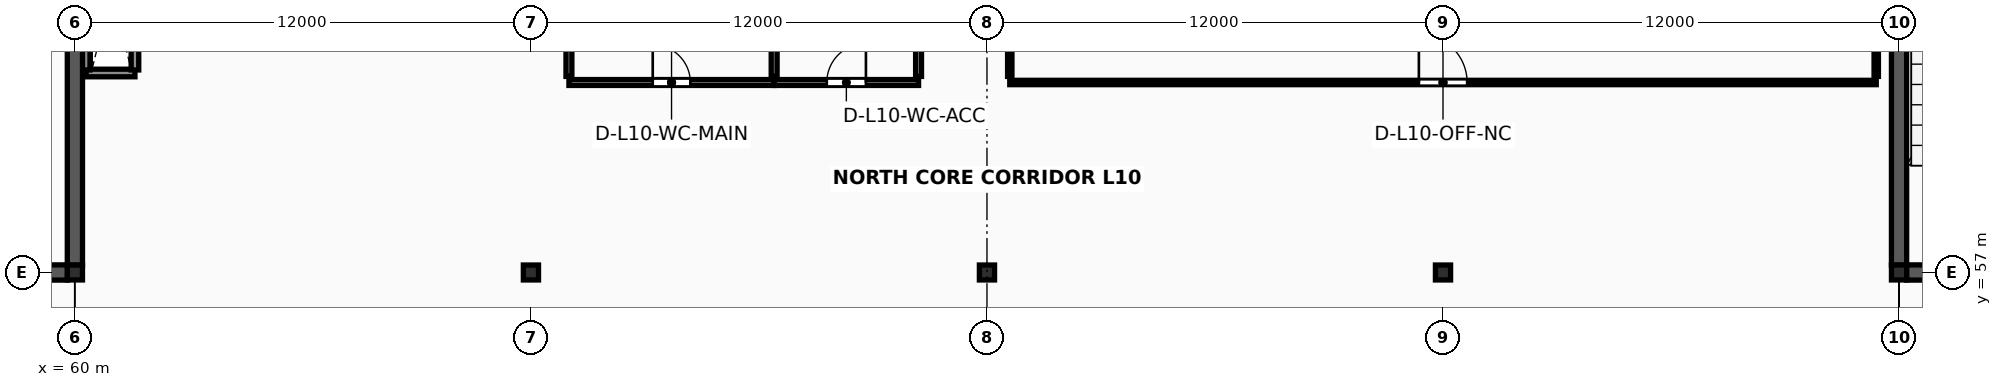
"""IFC4 building model, lengths in metres.
Left out: names, types, materials, properties, quantities, classifications, styles, units other than length and angle.
Written with IfcOpenShell. Run it as: python <this file> out.ifc"""

import sys

from ifc_helpers import new_model, si_unit, direction, frame, frame_2d, origin, origin_2d, place, context, subcontext, project, spatial, rectangle, i_section, extrude, element, fill, save


model = new_model("IFC4")
c1 = context("Model", 3, precision=1e-05, world=origin(), true_north=direction((0.0, 1.0)))
c2 = subcontext(c1, "Body", "Model", "MODEL_VIEW")
j1 = project(units=[si_unit("LENGTHUNIT", "METRE"), si_unit("PLANEANGLEUNIT", "RADIAN")], contexts=[c1])
p1 = place(None, origin())
s1 = spatial("IfcSite", under=j1, at=p1, CompositionType="ELEMENT")
p2 = place(p1, origin())
s2 = spatial("IfcBuilding", under=s1, at=p2, CompositionType="ELEMENT")
p3 = place(p2, frame((0.0, 0.0, 41.6)))
s3 = spatial("IfcBuildingStorey", under=s2, at=p3, CompositionType="ELEMENT", Elevation=41.6)
for number, where, z_axis, x_axis in (
    (1, (60.0, 57.0, 0.0), (0.0, 0.0, 1.0), (1.0, 0.0, 0.0)),
    (2, (72.0, 57.0, 0.0), (0.0, 0.0, 1.0), (1.0, 0.0, 0.0)),
    (3, (84.0, 57.0, 0.0), (0.0, 0.0, 1.0), (1.0, 0.0, 0.0)),
    (4, (96.0, 57.0, 0.0), (0.0, 0.0, 1.0), (1.0, 0.0, 0.0)),
    (5, (108.0, 57.0, 0.0), (0.0, 0.0, 1.0), (1.0, 0.0, 0.0)),
):
    element("IfcColumn", number, at=place(p3, frame(where, z_axis=z_axis, x_axis=x_axis)), inside=s3, PredefinedType="COLUMN", context=c2, shape_type="SweptSolid", body=[
        extrude(i_section(OverallWidth=0.399, OverallDepth=0.393, WebThickness=0.023, FlangeThickness=0.037, FilletRadius=0.018, at=origin_2d()), origin(), (0.0, 0.0, 1.0), 4.0),
    ])
p4 = place(p3, frame((60.297, 62.25, 0.0), z_axis=(0.0, 0.0, 1.0), x_axis=(1.0, 0.0, 0.0)))
e6 = element("IfcWall", 6, at=p4, inside=s3, PredefinedType="SOLIDWALL", context=c2, shape_type="SweptSolid", body=[
    extrude(rectangle(XDim=1.283, YDim=0.2, at=frame_2d((0.642, 0.0))), origin(), (0.0, 0.0, 1.0), 3.828),
])
for number, where, z_axis, x_axis in (
    (7, (60.297, 62.33, 0.0), (0.0, 0.0, 1.0), (0.0, 1.0, 0.0)),
    (8, (61.58, 62.33, 0.0), (0.0, 0.0, 1.0), (0.0, 1.0, 0.0)),
):
    element("IfcWall", number, at=place(p3, frame(where, z_axis=z_axis, x_axis=x_axis)), inside=s3, PredefinedType="SOLIDWALL", context=c2, shape_type="SweptSolid", body=[
        extrude(rectangle(XDim=4.14, YDim=0.2, at=frame_2d((2.07, 0.0))), origin(), (0.0, 0.0, 1.0), 3.828),
    ])
p5 = place(p3, frame((48.197, 57.0, 0.0), z_axis=(0.0, 0.0, 1.0), x_axis=(1.0, 0.0, 0.0)))
e9 = element("IfcWall", 9, at=p5, inside=s3, PredefinedType="SHEAR", context=c2, shape_type="SweptSolid", body=[
    extrude(rectangle(XDim=11.607, YDim=0.4, at=frame_2d((5.803, 0.0))), origin(), (0.0, 0.0, 1.0), 3.828),
])
p6 = place(p5, frame((5.004, 0.0, 0.0)))
e10 = element("IfcOpeningElement", 10, at=p6, cuts=e9, PredefinedType="OPENING", context=c2, shape_type="SweptSolid", body=[
    extrude(rectangle(XDim=1.2, YDim=2.2, at=frame_2d((0.6, 1.1))), frame((0.0, 0.215, 0.0), z_axis=(0.0, -1.0, 0.0), x_axis=(1.0, 0.0, 0.0)), (0.0, 0.0, 1.0), 0.43),
])
p7 = place(p5, frame((8.703, 0.0, 0.0)))
e11 = element("IfcOpeningElement", 11, at=p7, cuts=e9, PredefinedType="OPENING", context=c2, shape_type="SweptSolid", body=[
    extrude(rectangle(XDim=1.5, YDim=2.25, at=frame_2d((0.75, 1.125))), frame((0.0, 0.215, 0.0), z_axis=(0.0, -1.0, 0.0), x_axis=(1.0, 0.0, 0.0)), (0.0, 0.0, 1.0), 0.43),
])
p8 = place(p3, frame((60.0, 57.194, 0.0), z_axis=(0.0, 0.0, 1.0), x_axis=(0.0, 1.0, 0.0)))
e12 = element("IfcWall", 12, at=p8, inside=s3, PredefinedType="SHEAR", context=c2, shape_type="SweptSolid", body=[
    extrude(rectangle(XDim=11.613, YDim=0.4, at=frame_2d((5.806, 0.0))), origin(), (0.0, 0.0, 1.0), 3.828),
])
p9 = place(p3, frame((108.197, 57.0, 0.0), z_axis=(0.0, 0.0, 1.0), x_axis=(1.0, 0.0, 0.0)))
e13 = element("IfcWall", 13, at=p9, inside=s3, PredefinedType="SHEAR", context=c2, shape_type="SweptSolid", body=[
    extrude(rectangle(XDim=11.607, YDim=0.4, at=frame_2d((5.803, 0.0))), origin(), (0.0, 0.0, 1.0), 3.828),
])
p10 = place(p9, frame((5.004, 0.0, 0.0)))
e14 = element("IfcOpeningElement", 14, at=p10, cuts=e13, PredefinedType="OPENING", context=c2, shape_type="SweptSolid", body=[
    extrude(rectangle(XDim=1.2, YDim=2.2, at=frame_2d((0.6, 1.1))), frame((0.0, 0.215, 0.0), z_axis=(0.0, -1.0, 0.0), x_axis=(1.0, 0.0, 0.0)), (0.0, 0.0, 1.0), 0.43),
])
p11 = place(p9, frame((8.704, 0.0, 0.0)))
e15 = element("IfcOpeningElement", 15, at=p11, cuts=e13, PredefinedType="OPENING", context=c2, shape_type="SweptSolid", body=[
    extrude(rectangle(XDim=1.5, YDim=2.25, at=frame_2d((0.75, 1.125))), frame((0.0, 0.215, 0.0), z_axis=(0.0, -1.0, 0.0), x_axis=(1.0, 0.0, 0.0)), (0.0, 0.0, 1.0), 0.43),
])
p12 = place(p3, frame((108.0, 57.194, 0.0), z_axis=(0.0, 0.0, 1.0), x_axis=(0.0, 1.0, 0.0)))
e16 = element("IfcWall", 16, at=p12, inside=s3, PredefinedType="SHEAR", context=c2, shape_type="SweptSolid", body=[
    extrude(rectangle(XDim=11.613, YDim=0.4, at=frame_2d((5.806, 0.0))), origin(), (0.0, 0.0, 1.0), 3.828),
])
p13 = place(p3, frame((73.0, 62.0, 0.0), z_axis=(0.0, 0.0, 1.0), x_axis=(1.0, 0.0, 0.0)))
e17 = element("IfcWall", 17, at=p13, inside=s3, PredefinedType="PLUMBINGWALL", context=c2, shape_type="SweptSolid", body=[
    extrude(rectangle(XDim=5.4, YDim=0.155, at=frame_2d((2.7, 0.0))), origin(), (0.0, 0.0, 1.0), 2.88),
])
p14 = place(p13, frame((2.205, 0.0, 0.0)))
e18 = element("IfcOpeningElement", 18, at=p14, cuts=e17, PredefinedType="OPENING", context=c2, shape_type="SweptSolid", body=[
    extrude(rectangle(XDim=0.99, YDim=2.15, at=frame_2d((0.495, 1.075))), frame((0.0, 0.093, 0.0), z_axis=(0.0, -1.0, 0.0), x_axis=(1.0, 0.0, 0.0)), (0.0, 0.0, 1.0), 0.185),
])
for number, where, z_axis, x_axis in (
    (19, (73.0, 62.16, 0.0), (0.0, 0.0, 1.0), (0.0, 1.0, 0.0)),
    (20, (78.4, 62.16, 0.0), (0.0, 0.0, 1.0), (0.0, 1.0, 0.0)),
):
    element("IfcWall", number, at=place(p3, frame(where, z_axis=z_axis, x_axis=x_axis)), inside=s3, PredefinedType="PLUMBINGWALL", context=c2, shape_type="SweptSolid", body=[
        extrude(rectangle(XDim=4.48, YDim=0.155, at=frame_2d((2.24, 0.0))), origin(), (0.0, 0.0, 1.0), 2.88),
    ])
p15 = place(p3, frame((78.4, 62.0, 0.0), z_axis=(0.0, 0.0, 1.0), x_axis=(1.0, 0.0, 0.0)))
e21 = element("IfcWall", 21, at=p15, inside=s3, PredefinedType="PLUMBINGWALL", context=c2, shape_type="SweptSolid", body=[
    extrude(rectangle(XDim=3.8, YDim=0.155, at=frame_2d((1.9, 0.0))), origin(), (0.0, 0.0, 1.0), 2.88),
])
p16 = place(p15, frame((1.385, 0.0, 0.0)))
e22 = element("IfcOpeningElement", 22, at=p16, cuts=e21, PredefinedType="OPENING", context=c2, shape_type="SweptSolid", body=[
    extrude(rectangle(XDim=1.03, YDim=2.17, at=frame_2d((0.515, 1.085))), frame((0.0, 0.093, 0.0), z_axis=(0.0, -1.0, 0.0), x_axis=(1.0, 0.0, 0.0)), (0.0, 0.0, 1.0), 0.185),
])
p17 = place(p3, frame((82.2, 62.16, 0.0), z_axis=(0.0, 0.0, 1.0), x_axis=(0.0, 1.0, 0.0)))
e23 = element("IfcWall", 23, at=p17, inside=s3, PredefinedType="PLUMBINGWALL", context=c2, shape_type="SweptSolid", body=[
    extrude(rectangle(XDim=4.48, YDim=0.155, at=frame_2d((2.24, 0.0))), origin(), (0.0, 0.0, 1.0), 2.88),
])
p18 = place(p3, frame((84.6, 62.0, 0.0), z_axis=(0.0, 0.0, 1.0), x_axis=(1.0, 0.0, 0.0)))
e24 = element("IfcWall", 24, at=p18, inside=s3, PredefinedType="PARTITIONING", context=c2, shape_type="SweptSolid", body=[
    extrude(rectangle(XDim=22.8, YDim=0.115, at=frame_2d((11.4, 0.0))), origin(), (0.0, 0.0, 1.0), 2.88),
])
p19 = place(p18, frame((10.765, 0.0, 0.0)))
e25 = element("IfcOpeningElement", 25, at=p19, cuts=e24, PredefinedType="OPENING", context=c2, shape_type="SweptSolid", body=[
    extrude(rectangle(XDim=1.27, YDim=2.27, at=frame_2d((0.635, 1.135))), frame((0.0, 0.073, 0.0), z_axis=(0.0, -1.0, 0.0), x_axis=(1.0, 0.0, 0.0)), (0.0, 0.0, 1.0), 0.145),
])
for number, where, z_axis, x_axis in (
    (26, (84.6, 62.16, 0.0), (0.0, 0.0, 1.0), (0.0, 1.0, 0.0)),
    (27, (107.4, 62.16, 0.0), (0.0, 0.0, 1.0), (0.0, 1.0, 0.0)),
):
    element("IfcWall", number, at=place(p3, frame(where, z_axis=z_axis, x_axis=x_axis)), inside=s3, PredefinedType="PARTITIONING", context=c2, shape_type="SweptSolid", body=[
        extrude(rectangle(XDim=6.7, YDim=0.115, at=frame_2d((3.35, 0.0))), origin(), (0.0, 0.0, 1.0), 2.88),
    ])
p20 = place(p14, origin())
e28 = element("IfcDoor", 28, at=p20, inside=s3, OperationType="SINGLE_SWING_LEFT", PredefinedType="DOOR", context=c2, shape_type="SweptSolid", body=[
    extrude(rectangle(XDim=0.99, YDim=2.15, at=frame_2d((0.495, 1.075))), frame((0.0, 0.025, 0.0), z_axis=(0.0, -1.0, 0.0), x_axis=(1.0, 0.0, 0.0)), (0.0, 0.0, 1.0), 0.05),
])
fill(e18, e28)
p21 = place(p16, origin())
e29 = element("IfcDoor", 29, at=p21, inside=s3, OperationType="SINGLE_SWING_RIGHT", PredefinedType="DOOR", context=c2, shape_type="SweptSolid", body=[
    extrude(rectangle(XDim=1.03, YDim=2.17, at=frame_2d((0.515, 1.085))), frame((0.0, 0.025, 0.0), z_axis=(0.0, -1.0, 0.0), x_axis=(1.0, 0.0, 0.0)), (0.0, 0.0, 1.0), 0.05),
])
fill(e22, e29)
p22 = place(p19, origin())
e30 = element("IfcDoor", 30, at=p22, inside=s3, OperationType="SINGLE_SWING_LEFT", PredefinedType="DOOR", context=c2, shape_type="SweptSolid", body=[
    extrude(rectangle(XDim=1.27, YDim=2.27, at=frame_2d((0.635, 1.135))), frame((0.0, 0.025, 0.0), z_axis=(0.0, -1.0, 0.0), x_axis=(1.0, 0.0, 0.0)), (0.0, 0.0, 1.0), 0.05),
])
fill(e25, e30)
save(model, sys.argv[1])
